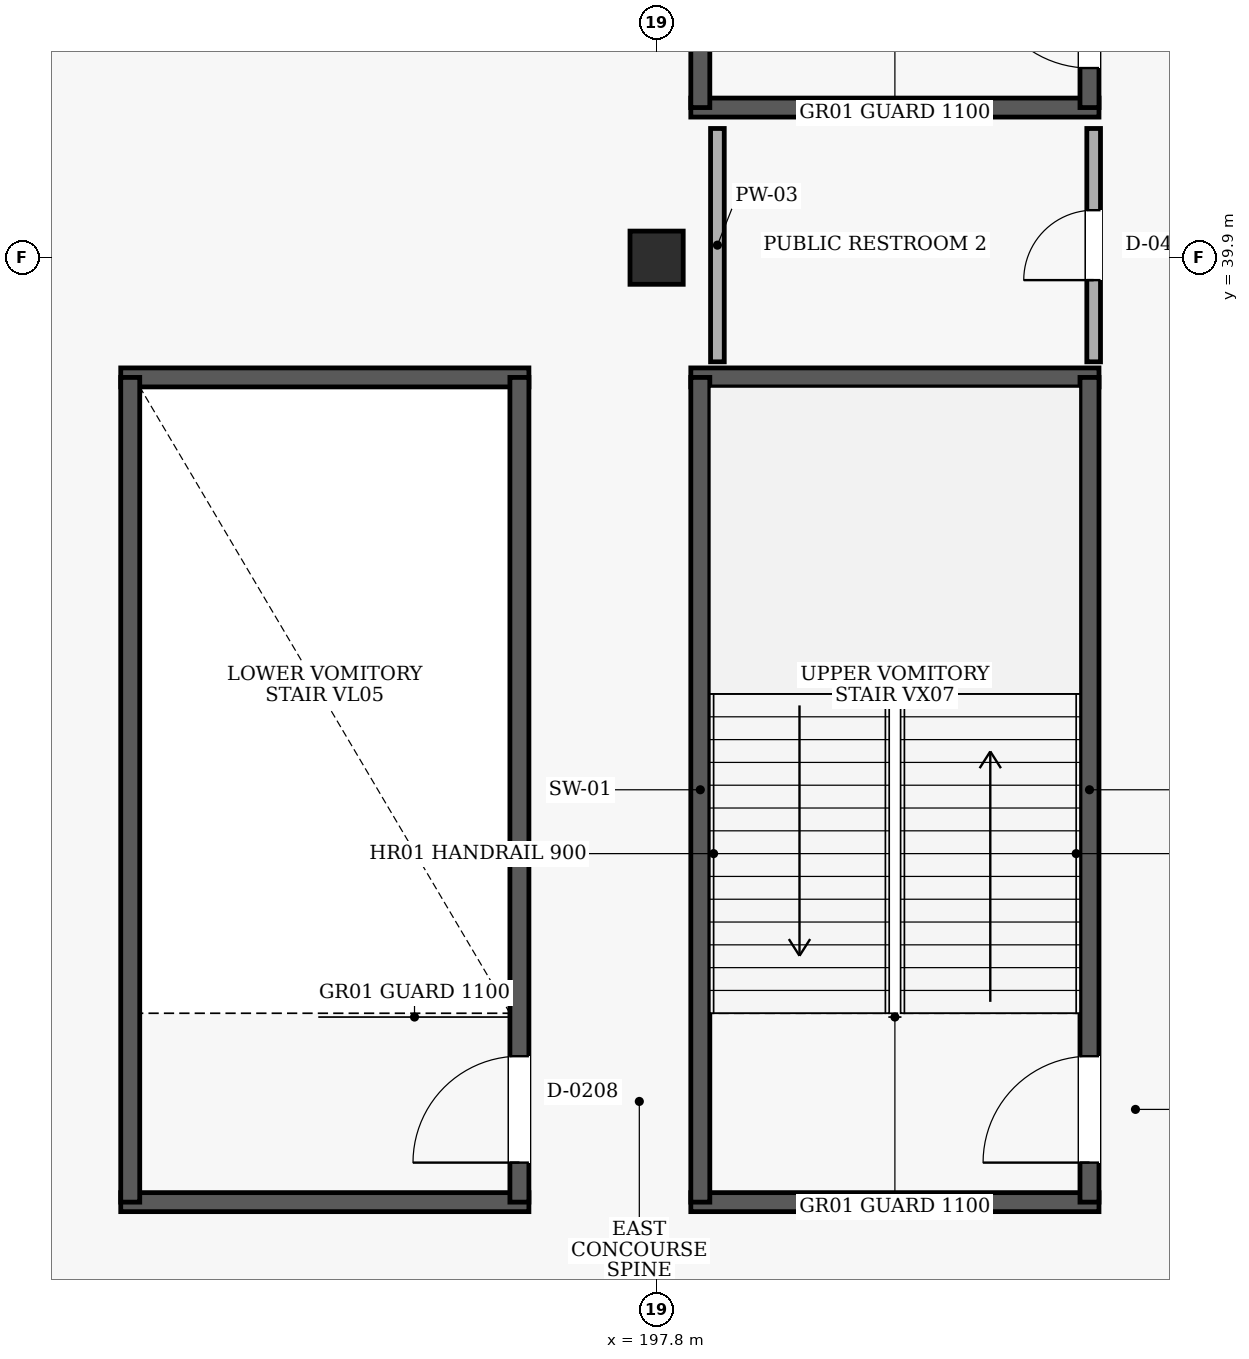
"""IFC4 building model, lengths in metres.
Left out: names, types, materials, properties, quantities, classifications, styles, units other than length and angle.
Written with IfcOpenShell. Run it as: python <this file> out.ifc"""

import sys

from ifc_helpers import new_model, si_unit, direction, frame, frame_2d, origin, origin_2d, place, context, subcontext, project, spatial, rectangle, extrude, element, fill, save


model = new_model("IFC4")
c1 = context("Model", 3, precision=1e-05, world=origin(), true_north=direction((0.0, 1.0)))
c2 = subcontext(c1, "Body", "Model", "MODEL_VIEW")
j1 = project(units=[si_unit("LENGTHUNIT", "METRE"), si_unit("PLANEANGLEUNIT", "RADIAN")], contexts=[c1])
p1 = place(None, origin())
s1 = spatial("IfcSite", under=j1, at=p1, CompositionType="ELEMENT")
p2 = place(p1, origin())
s2 = spatial("IfcBuilding", under=s1, at=p2, CompositionType="ELEMENT")
p3 = place(p2, frame((0.0, 0.0, 5.4)))
s3 = spatial("IfcBuildingStorey", under=s2, at=p3, CompositionType="ELEMENT", Elevation=5.4)
p4 = place(p3, frame((197.8, 39.9, 0.0), z_axis=(0.0, 0.0, 1.0), x_axis=(1.0, 0.0, 0.0)))
e1 = element("IfcColumn", 1, at=p4, inside=s3, PredefinedType="COLUMN", context=c2, shape_type="SweptSolid", body=[
    extrude(rectangle(XDim=0.7, YDim=0.7, at=origin_2d()), origin(), (0.0, 0.0, 1.0), 4.8),
])
for number, where, z_axis, x_axis in (
    (2, (198.25, 27.475, 0.0), (0.0, 0.0, 1.0), (1.0, 0.0, 0.0)),
    (3, (203.62, 38.325, 0.0), (0.0, 0.0, 1.0), (-1.0, 0.0, 0.0)),
):
    element("IfcWall", number, at=place(p3, frame(where, z_axis=z_axis, x_axis=x_axis)), inside=s3, PredefinedType="SHEAR", context=c2, shape_type="SweptSolid", body=[
        extrude(rectangle(XDim=5.37, YDim=0.25, at=frame_2d((2.685, 0.0))), origin(), (0.0, 0.0, 1.0), 4.5),
    ])
p5 = place(p3, frame((198.375, 27.475, 0.0), z_axis=(0.0, 0.0, 1.0), x_axis=(0.0, 1.0, 0.0)))
e4 = element("IfcWall", 4, at=p5, inside=s3, PredefinedType="SHEAR", context=c2, shape_type="SweptSolid", body=[
    extrude(rectangle(XDim=10.85, YDim=0.25, at=frame_2d((5.425, 0.0))), origin(), (0.0, 0.0, 1.0), 4.5),
])
p6 = place(p3, frame((203.495, 27.475, 0.0), z_axis=(0.0, 0.0, 1.0), x_axis=(0.0, 1.0, 0.0)))
e5 = element("IfcWall", 5, at=p6, inside=s3, PredefinedType="SHEAR", context=c2, shape_type="SweptSolid", body=[
    extrude(rectangle(XDim=10.85, YDim=0.25, at=frame_2d((5.425, 0.0))), origin(), (0.0, 0.0, 1.0), 4.5),
])
p7 = place(p6, frame((0.52, 0.0, 0.0)))
e6 = element("IfcOpeningElement", 6, at=p7, cuts=e5, PredefinedType="OPENING", context=c2, shape_type="SweptSolid", body=[
    extrude(rectangle(XDim=1.4, YDim=2.15, at=frame_2d((0.7, 1.075))), frame((0.0, 0.135, 0.0), z_axis=(0.0, -1.0, 0.0), x_axis=(1.0, 0.0, 0.0)), (0.0, 0.0, 1.0), 0.27),
])
p8 = place(p3, frame((198.25, 41.875, 0.0), z_axis=(0.0, 0.0, 1.0), x_axis=(1.0, 0.0, 0.0)))
e7 = element("IfcWall", 7, at=p8, inside=s3, PredefinedType="SHEAR", context=c2, shape_type="SweptSolid", body=[
    extrude(rectangle(XDim=5.37, YDim=0.25, at=frame_2d((2.685, 0.0))), origin(), (0.0, 0.0, 1.0), 4.5),
])
p9 = place(p3, frame((198.375, 41.875, 0.0), z_axis=(0.0, 0.0, 1.0), x_axis=(0.0, 1.0, 0.0)))
e8 = element("IfcWall", 8, at=p9, inside=s3, PredefinedType="SHEAR", context=c2, shape_type="SweptSolid", body=[
    extrude(rectangle(XDim=10.85, YDim=0.25, at=frame_2d((5.425, 0.0))), origin(), (0.0, 0.0, 1.0), 4.5),
])
p10 = place(p3, frame((203.495, 41.875, 0.0), z_axis=(0.0, 0.0, 1.0), x_axis=(0.0, 1.0, 0.0)))
e9 = element("IfcWall", 9, at=p10, inside=s3, PredefinedType="SHEAR", context=c2, shape_type="SweptSolid", body=[
    extrude(rectangle(XDim=10.85, YDim=0.25, at=frame_2d((5.425, 0.0))), origin(), (0.0, 0.0, 1.0), 4.5),
])
p11 = place(p10, frame((0.52, 0.0, 0.0)))
e10 = element("IfcOpeningElement", 10, at=p11, cuts=e9, PredefinedType="OPENING", context=c2, shape_type="SweptSolid", body=[
    extrude(rectangle(XDim=1.4, YDim=2.15, at=frame_2d((0.7, 1.075))), frame((0.0, 0.135, 0.0), z_axis=(0.0, -1.0, 0.0), x_axis=(1.0, 0.0, 0.0)), (0.0, 0.0, 1.0), 0.27),
])
for number, where, z_axis, x_axis in (
    (11, (190.75, 27.475, 0.0), (0.0, 0.0, 1.0), (1.0, 0.0, 0.0)),
    (12, (196.12, 38.325, 0.0), (0.0, 0.0, 1.0), (-1.0, 0.0, 0.0)),
):
    element("IfcWall", number, at=place(p3, frame(where, z_axis=z_axis, x_axis=x_axis)), inside=s3, PredefinedType="SHEAR", context=c2, shape_type="SweptSolid", body=[
        extrude(rectangle(XDim=5.37, YDim=0.25, at=frame_2d((2.685, 0.0))), origin(), (0.0, 0.0, 1.0), 4.5),
    ])
p12 = place(p3, frame((190.875, 27.475, 0.0), z_axis=(0.0, 0.0, 1.0), x_axis=(0.0, 1.0, 0.0)))
e13 = element("IfcWall", 13, at=p12, inside=s3, PredefinedType="SHEAR", context=c2, shape_type="SweptSolid", body=[
    extrude(rectangle(XDim=10.85, YDim=0.25, at=frame_2d((5.425, 0.0))), origin(), (0.0, 0.0, 1.0), 4.5),
])
p13 = place(p3, frame((195.995, 27.475, 0.0), z_axis=(0.0, 0.0, 1.0), x_axis=(0.0, 1.0, 0.0)))
e14 = element("IfcWall", 14, at=p13, inside=s3, PredefinedType="SHEAR", context=c2, shape_type="SweptSolid", body=[
    extrude(rectangle(XDim=10.85, YDim=0.25, at=frame_2d((5.425, 0.0))), origin(), (0.0, 0.0, 1.0), 4.5),
])
p14 = place(p13, frame((0.52, 0.0, 0.0)))
e15 = element("IfcOpeningElement", 15, at=p14, cuts=e14, PredefinedType="OPENING", context=c2, shape_type="SweptSolid", body=[
    extrude(rectangle(XDim=1.4, YDim=2.15, at=frame_2d((0.7, 1.075))), frame((0.0, 0.135, 0.0), z_axis=(0.0, -1.0, 0.0), x_axis=(1.0, 0.0, 0.0)), (0.0, 0.0, 1.0), 0.27),
])
p15 = place(p3, frame((203.55, 38.53, 0.0), z_axis=(0.0, 0.0, 1.0), x_axis=(0.0, 1.0, 0.0)))
e16 = element("IfcWall", 16, at=p15, inside=s3, PredefinedType="PARTITIONING", context=c2, shape_type="SweptSolid", body=[
    extrude(rectangle(XDim=3.07, YDim=0.18, at=frame_2d((1.535, 0.0))), origin(), (0.0, 0.0, 1.0), 4.5),
])
p16 = place(p15, frame((1.075, 0.0, 0.0)))
e17 = element("IfcOpeningElement", 17, at=p16, cuts=e16, PredefinedType="OPENING", context=c2, shape_type="SweptSolid", body=[
    extrude(rectangle(XDim=0.92, YDim=2.1, at=frame_2d((0.46, 1.05))), frame((0.0, 0.1, 0.0), z_axis=(0.0, -1.0, 0.0), x_axis=(1.0, 0.0, 0.0)), (0.0, 0.0, 1.0), 0.2),
])
p17 = place(p3, frame((198.6, 41.6, 0.0), z_axis=(0.0, 0.0, 1.0), x_axis=(0.0, -1.0, 0.0)))
e18 = element("IfcWall", 18, at=p17, inside=s3, PredefinedType="PARTITIONING", context=c2, shape_type="SweptSolid", body=[
    extrude(rectangle(XDim=3.07, YDim=0.18, at=frame_2d((1.535, 0.0))), origin(), (0.0, 0.0, 1.0), 4.5),
])
p18 = place(p7, origin())
e19 = element("IfcDoor", 19, at=p18, inside=s3, OperationType="SINGLE_SWING_LEFT", PredefinedType="DOOR", context=c2, shape_type="SweptSolid", body=[
    extrude(rectangle(XDim=1.4, YDim=2.15, at=frame_2d((0.7, 1.075))), frame((0.0, 0.025, 0.0), z_axis=(0.0, -1.0, 0.0), x_axis=(1.0, 0.0, 0.0)), (0.0, 0.0, 1.0), 0.05),
])
fill(e6, e19)
p19 = place(p11, origin())
e20 = element("IfcDoor", 20, at=p19, inside=s3, OperationType="SINGLE_SWING_RIGHT", PredefinedType="DOOR", context=c2, shape_type="SweptSolid", body=[
    extrude(rectangle(XDim=1.4, YDim=2.15, at=frame_2d((0.7, 1.075))), frame((0.0, 0.025, 0.0), z_axis=(0.0, -1.0, 0.0), x_axis=(1.0, 0.0, 0.0)), (0.0, 0.0, 1.0), 0.05),
])
fill(e10, e20)
p20 = place(p14, origin())
e21 = element("IfcDoor", 21, at=p20, inside=s3, OperationType="SINGLE_SWING_LEFT", PredefinedType="DOOR", context=c2, shape_type="SweptSolid", body=[
    extrude(rectangle(XDim=1.4, YDim=2.15, at=frame_2d((0.7, 1.075))), frame((0.0, 0.025, 0.0), z_axis=(0.0, -1.0, 0.0), x_axis=(1.0, 0.0, 0.0)), (0.0, 0.0, 1.0), 0.05),
])
fill(e15, e21)
p21 = place(p16, origin())
e22 = element("IfcDoor", 22, at=p21, inside=s3, OperationType="SINGLE_SWING_LEFT", PredefinedType="DOOR", context=c2, shape_type="SweptSolid", body=[
    extrude(rectangle(XDim=0.92, YDim=2.1, at=frame_2d((0.46, 1.05))), frame((0.0, 0.025, 0.0), z_axis=(0.0, -1.0, 0.0), x_axis=(1.0, 0.0, 0.0)), (0.0, 0.0, 1.0), 0.05),
])
fill(e17, e22)
save(model, sys.argv[1])
